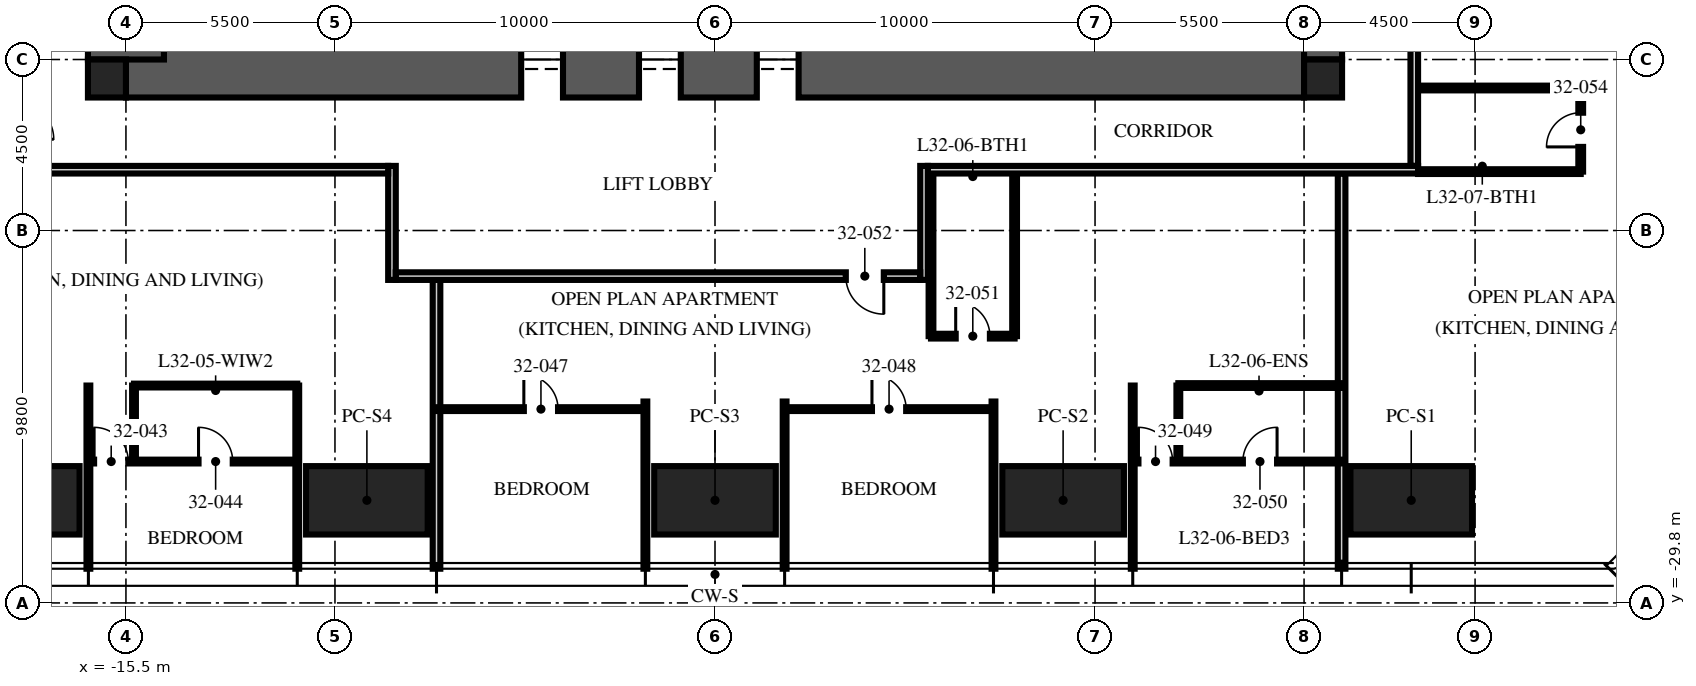
"""IFC4 building model, lengths in metres.
Left out: names, types, materials, properties, quantities, classifications, styles, units other than length and angle.
Written with IfcOpenShell. Run it as: python <this file> out.ifc"""

import sys

from ifc_helpers import new_model, si_unit, direction, frame, frame_2d, origin, origin_2d, place, context, subcontext, project, spatial, rectangle, extrude, element, fill, save


model = new_model("IFC4")
c1 = context("Model", 3, precision=1e-05, world=origin(), true_north=direction((0.0, 1.0)))
c2 = subcontext(c1, "Body", "Model", "MODEL_VIEW")
j1 = project(units=[si_unit("LENGTHUNIT", "METRE"), si_unit("PLANEANGLEUNIT", "RADIAN")], contexts=[c1])
p1 = place(None, origin())
s1 = spatial("IfcSite", under=j1, at=p1, CompositionType="ELEMENT")
p2 = place(p1, origin())
s2 = spatial("IfcBuilding", under=s1, at=p2, CompositionType="ELEMENT")
p3 = place(p2, frame((0.0, 0.0, 129.75)))
s3 = spatial("IfcBuildingStorey", under=s2, at=p3, CompositionType="ELEMENT", Elevation=129.75)
p4 = place(p3, frame((15.5, -15.5, -0.25), z_axis=(0.0, 0.0, 1.0), x_axis=(0.0, 1.0, 0.0)))
e1 = element("IfcWall", 1, at=p4, inside=s3, PredefinedType="SHEAR", context=c2, shape_type="SweptSolid", body=[
    extrude(rectangle(XDim=31.0, YDim=2.0, at=frame_2d((15.5, 0.0))), origin(), (0.0, 0.0, 1.0), 3.75),
])
p5 = place(p4, frame((6.5, 0.0, 0.25)))
e2 = element("IfcOpeningElement", 2, at=p5, cuts=e1, PredefinedType="OPENING", context=c2, shape_type="SweptSolid", body=[
    extrude(rectangle(XDim=1.2, YDim=2.1, at=frame_2d((0.6, 1.05))), frame((0.0, 1.01, 0.0), z_axis=(0.0, -1.0, 0.0), x_axis=(1.0, 0.0, 0.0)), (0.0, 0.0, 1.0), 2.02),
])
p6 = place(p4, frame((23.0, 0.0, 0.25)))
e3 = element("IfcOpeningElement", 3, at=p6, cuts=e1, PredefinedType="OPENING", context=c2, shape_type="SweptSolid", body=[
    extrude(rectangle(XDim=1.8, YDim=2.1, at=frame_2d((0.9, 1.05))), frame((0.0, 1.01, 0.0), z_axis=(0.0, -1.0, 0.0), x_axis=(1.0, 0.0, 0.0)), (0.0, 0.0, 1.0), 2.02),
])
p7 = place(p3, frame((-15.5, -15.5, -0.25), z_axis=(0.0, 0.0, 1.0), x_axis=(1.0, 0.0, 0.0)))
e4 = element("IfcWall", 4, at=p7, inside=s3, PredefinedType="SHEAR", context=c2, shape_type="SweptSolid", body=[
    extrude(rectangle(XDim=31.0, YDim=2.0, at=frame_2d((15.5, 0.0))), origin(), (0.0, 0.0, 1.0), 3.75),
])
p8 = place(p7, frame((10.4, 0.0, 0.25)))
e5 = element("IfcOpeningElement", 5, at=p8, cuts=e4, PredefinedType="OPENING", context=c2, shape_type="SweptSolid", body=[
    extrude(rectangle(XDim=1.1, YDim=2.1, at=frame_2d((0.55, 1.05))), frame((0.0, 1.01, 0.0), z_axis=(0.0, -1.0, 0.0), x_axis=(1.0, 0.0, 0.0)), (0.0, 0.0, 1.0), 2.02),
])
p9 = place(p7, frame((13.5, 0.0, 0.25)))
e6 = element("IfcOpeningElement", 6, at=p9, cuts=e4, PredefinedType="OPENING", context=c2, shape_type="SweptSolid", body=[
    extrude(rectangle(XDim=1.1, YDim=2.1, at=frame_2d((0.55, 1.05))), frame((0.0, 1.01, 0.0), z_axis=(0.0, -1.0, 0.0), x_axis=(1.0, 0.0, 0.0)), (0.0, 0.0, 1.0), 2.02),
])
p10 = place(p7, frame((16.6, 0.0, 0.25)))
e7 = element("IfcOpeningElement", 7, at=p10, cuts=e4, PredefinedType="OPENING", context=c2, shape_type="SweptSolid", body=[
    extrude(rectangle(XDim=1.1, YDim=2.1, at=frame_2d((0.55, 1.05))), frame((0.0, 1.01, 0.0), z_axis=(0.0, -1.0, 0.0), x_axis=(1.0, 0.0, 0.0)), (0.0, 0.0, 1.0), 2.02),
])
p11 = place(p3, frame((-15.5, -15.5, -0.25), z_axis=(0.0, 0.0, 1.0), x_axis=(0.0, 1.0, 0.0)))
e8 = element("IfcWall", 8, at=p11, inside=s3, PredefinedType="SHEAR", context=c2, shape_type="SweptSolid", body=[
    extrude(rectangle(XDim=31.0, YDim=2.0, at=frame_2d((15.5, 0.0))), origin(), (0.0, 0.0, 1.0), 3.75),
])
p12 = place(p11, frame((6.5, 0.0, 0.25)))
e9 = element("IfcOpeningElement", 9, at=p12, cuts=e8, PredefinedType="OPENING", context=c2, shape_type="SweptSolid", body=[
    extrude(rectangle(XDim=1.2, YDim=2.1, at=frame_2d((0.6, 1.05))), frame((0.0, 1.01, 0.0), z_axis=(0.0, -1.0, 0.0), x_axis=(1.0, 0.0, 0.0)), (0.0, 0.0, 1.0), 2.02),
])
p13 = place(p11, frame((23.0, 0.0, 0.25)))
e10 = element("IfcOpeningElement", 10, at=p13, cuts=e8, PredefinedType="OPENING", context=c2, shape_type="SweptSolid", body=[
    extrude(rectangle(XDim=1.8, YDim=2.1, at=frame_2d((0.9, 1.05))), frame((0.0, 1.01, 0.0), z_axis=(0.0, -1.0, 0.0), x_axis=(1.0, 0.0, 0.0)), (0.0, 0.0, 1.0), 2.02),
])
for number, where, z_axis, x_axis in (
    (11, (-16.0, -16.0, -0.25), (0.0, 0.0, 1.0), (1.0, 0.0, 0.0)),
    (12, (16.0, -16.0, -0.25), (0.0, 0.0, 1.0), (1.0, 0.0, 0.0)),
):
    element("IfcColumn", number, at=place(p3, frame(where, z_axis=z_axis, x_axis=x_axis)), inside=s3, PredefinedType="COLUMN", context=c2, shape_type="SweptSolid", body=[
        extrude(rectangle(XDim=1.0, YDim=1.0, at=origin_2d()), origin(), (0.0, 0.0, 1.0), 3.75),
    ])
for number, where, z_axis, x_axis in (
    (13, (18.32, -27.1, 0.0), (0.0, 0.0, 1.0), (1.0, 0.0, 0.0)),
    (14, (9.16, -27.1, 0.0), (0.0, 0.0, 1.0), (1.0, 0.0, 0.0)),
    (15, (0.0, -27.1, 0.0), (0.0, 0.0, 1.0), (1.0, 0.0, 0.0)),
    (16, (-9.16, -27.1, 0.0), (0.0, 0.0, 1.0), (1.0, 0.0, 0.0)),
    (17, (-18.32, -27.1, 0.0), (0.0, 0.0, 1.0), (1.0, 0.0, 0.0)),
):
    element("IfcColumn", number, at=place(p3, frame(where, z_axis=z_axis, x_axis=x_axis)), inside=s3, PredefinedType="COLUMN", context=c2, shape_type="SweptSolid", body=[
        extrude(rectangle(XDim=3.2, YDim=1.8, at=origin_2d()), origin(), (0.0, 0.0, 1.0), 3.75),
    ])
for number, where, z_axis, x_axis in (
    (18, (-16.488, -24.08, 0.0), (0.0, 0.0, 1.0), (0.0, -1.0, 0.0)),
    (19, (-10.992, -24.08, 0.0), (0.0, 0.0, 1.0), (0.0, -1.0, 0.0)),
):
    element("IfcWall", number, at=place(p3, frame(where, z_axis=z_axis, x_axis=x_axis)), inside=s3, PredefinedType="PARTITIONING", context=c2, shape_type="SweptSolid", body=[
        extrude(rectangle(XDim=4.82, YDim=0.1, at=frame_2d((2.41, 0.0))), origin(), (0.0, 0.0, 1.0), 2.81),
    ])
p14 = place(p3, frame((-7.328, -21.3, 0.0), z_axis=(0.0, 0.0, 1.0), x_axis=(0.0, -1.0, 0.0)))
e20 = element("IfcWall", 20, at=p14, inside=s3, PredefinedType="PARTITIONING", context=c2, shape_type="SweptSolid", body=[
    extrude(rectangle(XDim=7.6, YDim=0.2, at=frame_2d((3.8, 0.0))), origin(), (0.0, 0.0, 1.0), 2.81),
])
for number, where, z_axis, x_axis in (
    (21, (-1.832, -24.5, 0.0), (0.0, 0.0, 1.0), (0.0, -1.0, 0.0)),
    (22, (1.832, -24.5, 0.0), (0.0, 0.0, 1.0), (0.0, -1.0, 0.0)),
    (23, (7.328, -24.5, 0.0), (0.0, 0.0, 1.0), (0.0, -1.0, 0.0)),
):
    element("IfcWall", number, at=place(p3, frame(where, z_axis=z_axis, x_axis=x_axis)), inside=s3, PredefinedType="PARTITIONING", context=c2, shape_type="SweptSolid", body=[
        extrude(rectangle(XDim=4.4, YDim=0.1, at=frame_2d((2.2, 0.0))), origin(), (0.0, 0.0, 1.0), 2.81),
    ])
p15 = place(p3, frame((10.992, -24.08, 0.0), z_axis=(0.0, 0.0, 1.0), x_axis=(0.0, -1.0, 0.0)))
e24 = element("IfcWall", 24, at=p15, inside=s3, PredefinedType="PARTITIONING", context=c2, shape_type="SweptSolid", body=[
    extrude(rectangle(XDim=4.82, YDim=0.1, at=frame_2d((2.41, 0.0))), origin(), (0.0, 0.0, 1.0), 2.81),
])
p16 = place(p3, frame((16.488, -18.5, 0.0), z_axis=(0.0, 0.0, 1.0), x_axis=(0.0, -1.0, 0.0)))
e25 = element("IfcWall", 25, at=p16, inside=s3, PredefinedType="PARTITIONING", context=c2, shape_type="SweptSolid", body=[
    extrude(rectangle(XDim=10.4, YDim=0.2, at=frame_2d((5.2, 0.0))), origin(), (0.0, 0.0, 1.0), 2.81),
])
p17 = place(p3, frame((-16.488, -26.08, 0.0), z_axis=(0.0, 0.0, 1.0), x_axis=(1.0, 0.0, 0.0)))
e26 = element("IfcWall", 26, at=p17, inside=s3, PredefinedType="PARTITIONING", context=c2, shape_type="SweptSolid", body=[
    extrude(rectangle(XDim=5.496, YDim=0.1, at=frame_2d((2.748, 0.0))), origin(), (0.0, 0.0, 1.0), 2.81),
])
p18 = place(p17, frame((0.15, 0.0, 0.0)))
e27 = element("IfcOpeningElement", 27, at=p18, cuts=e26, PredefinedType="OPENING", context=c2, shape_type="SweptSolid", body=[
    extrude(rectangle(XDim=0.9, YDim=2.1, at=frame_2d((0.45, 1.05))), frame((0.0, 0.06, 0.0), z_axis=(0.0, -1.0, 0.0), x_axis=(1.0, 0.0, 0.0)), (0.0, 0.0, 1.0), 0.12),
])
p19 = place(p17, frame((2.898, 0.0, 0.0)))
e28 = element("IfcOpeningElement", 28, at=p19, cuts=e26, PredefinedType="OPENING", context=c2, shape_type="SweptSolid", body=[
    extrude(rectangle(XDim=0.9, YDim=2.1, at=frame_2d((0.45, 1.05))), frame((0.0, 0.06, 0.0), z_axis=(0.0, -1.0, 0.0), x_axis=(1.0, 0.0, 0.0)), (0.0, 0.0, 1.0), 0.12),
])
p20 = place(p3, frame((-15.288, -24.08, 0.0), z_axis=(0.0, 0.0, 1.0), x_axis=(0.0, -1.0, 0.0)))
e29 = element("IfcWall", 29, at=p20, inside=s3, PredefinedType="PARTITIONING", context=c2, shape_type="SweptSolid", body=[
    extrude(rectangle(XDim=2.0, YDim=0.1, at=frame_2d((1.0, 0.0))), origin(), (0.0, 0.0, 1.0), 3.5),
])
p21 = place(p3, frame((-15.288, -24.08, 0.0), z_axis=(0.0, 0.0, 1.0), x_axis=(1.0, 0.0, 0.0)))
e30 = element("IfcWall", 30, at=p21, inside=s3, PredefinedType="PARTITIONING", context=c2, shape_type="SweptSolid", body=[
    extrude(rectangle(XDim=4.296, YDim=0.1, at=frame_2d((2.148, 0.0))), origin(), (0.0, 0.0, 1.0), 2.81),
])
p22 = place(p3, frame((-7.328, -24.7, 0.0), z_axis=(0.0, 0.0, 1.0), x_axis=(1.0, 0.0, 0.0)))
e31 = element("IfcWall", 31, at=p22, inside=s3, PredefinedType="PARTITIONING", context=c2, shape_type="SweptSolid", body=[
    extrude(rectangle(XDim=5.496, YDim=0.1, at=frame_2d((2.748, 0.0))), origin(), (0.0, 0.0, 1.0), 2.81),
])
p23 = place(p22, frame((2.298, 0.0, 0.0)))
e32 = element("IfcOpeningElement", 32, at=p23, cuts=e31, PredefinedType="OPENING", context=c2, shape_type="SweptSolid", body=[
    extrude(rectangle(XDim=0.9, YDim=2.1, at=frame_2d((0.45, 1.05))), frame((0.0, 0.06, 0.0), z_axis=(0.0, -1.0, 0.0), x_axis=(1.0, 0.0, 0.0)), (0.0, 0.0, 1.0), 0.12),
])
p24 = place(p3, frame((1.832, -24.7, 0.0), z_axis=(0.0, 0.0, 1.0), x_axis=(1.0, 0.0, 0.0)))
e33 = element("IfcWall", 33, at=p24, inside=s3, PredefinedType="PARTITIONING", context=c2, shape_type="SweptSolid", body=[
    extrude(rectangle(XDim=5.496, YDim=0.1, at=frame_2d((2.748, 0.0))), origin(), (0.0, 0.0, 1.0), 2.81),
])
p25 = place(p24, frame((2.298, 0.0, 0.0)))
e34 = element("IfcOpeningElement", 34, at=p25, cuts=e33, PredefinedType="OPENING", context=c2, shape_type="SweptSolid", body=[
    extrude(rectangle(XDim=0.9, YDim=2.1, at=frame_2d((0.45, 1.05))), frame((0.0, 0.06, 0.0), z_axis=(0.0, -1.0, 0.0), x_axis=(1.0, 0.0, 0.0)), (0.0, 0.0, 1.0), 0.12),
])
p26 = place(p3, frame((10.992, -26.08, 0.0), z_axis=(0.0, 0.0, 1.0), x_axis=(1.0, 0.0, 0.0)))
e35 = element("IfcWall", 35, at=p26, inside=s3, PredefinedType="PARTITIONING", context=c2, shape_type="SweptSolid", body=[
    extrude(rectangle(XDim=5.496, YDim=0.1, at=frame_2d((2.748, 0.0))), origin(), (0.0, 0.0, 1.0), 2.81),
])
p27 = place(p26, frame((0.15, 0.0, 0.0)))
e36 = element("IfcOpeningElement", 36, at=p27, cuts=e35, PredefinedType="OPENING", context=c2, shape_type="SweptSolid", body=[
    extrude(rectangle(XDim=0.9, YDim=2.1, at=frame_2d((0.45, 1.05))), frame((0.0, 0.06, 0.0), z_axis=(0.0, -1.0, 0.0), x_axis=(1.0, 0.0, 0.0)), (0.0, 0.0, 1.0), 0.12),
])
p28 = place(p26, frame((2.898, 0.0, 0.0)))
e37 = element("IfcOpeningElement", 37, at=p28, cuts=e35, PredefinedType="OPENING", context=c2, shape_type="SweptSolid", body=[
    extrude(rectangle(XDim=0.9, YDim=2.1, at=frame_2d((0.45, 1.05))), frame((0.0, 0.06, 0.0), z_axis=(0.0, -1.0, 0.0), x_axis=(1.0, 0.0, 0.0)), (0.0, 0.0, 1.0), 0.12),
])
p29 = place(p3, frame((12.192, -24.08, 0.0), z_axis=(0.0, 0.0, 1.0), x_axis=(0.0, -1.0, 0.0)))
e38 = element("IfcWall", 38, at=p29, inside=s3, PredefinedType="PARTITIONING", context=c2, shape_type="SweptSolid", body=[
    extrude(rectangle(XDim=2.0, YDim=0.1, at=frame_2d((1.0, 0.0))), origin(), (0.0, 0.0, 1.0), 3.5),
])
p30 = place(p3, frame((12.192, -24.08, 0.0), z_axis=(0.0, 0.0, 1.0), x_axis=(1.0, 0.0, 0.0)))
e39 = element("IfcWall", 39, at=p30, inside=s3, PredefinedType="PARTITIONING", context=c2, shape_type="SweptSolid", body=[
    extrude(rectangle(XDim=4.296, YDim=0.125, at=frame_2d((2.148, 0.0))), origin(), (0.0, 0.0, 1.0), 2.81),
])
p31 = place(p3, frame((5.684, -22.78, 0.0), z_axis=(0.0, 0.0, 1.0), x_axis=(1.0, 0.0, 0.0)))
e40 = element("IfcWall", 40, at=p31, inside=s3, PredefinedType="PARTITIONING", context=c2, shape_type="SweptSolid", body=[
    extrude(rectangle(XDim=2.2, YDim=0.125, at=frame_2d((1.1, 0.0))), origin(), (0.0, 0.0, 1.0), 3.5),
])
p32 = place(p31, frame((0.65, 0.0, 0.0)))
e41 = element("IfcOpeningElement", 41, at=p32, cuts=e40, PredefinedType="OPENING", context=c2, shape_type="SweptSolid", body=[
    extrude(rectangle(XDim=0.9, YDim=2.1, at=frame_2d((0.45, 1.05))), frame((0.0, 0.073, 0.0), z_axis=(0.0, -1.0, 0.0), x_axis=(1.0, 0.0, 0.0)), (0.0, 0.0, 1.0), 0.145),
])
for number, where, z_axis, x_axis in (
    (42, (5.684, -18.5, 0.0), (0.0, 0.0, 1.0), (0.0, -1.0, 0.0)),
    (43, (7.884, -18.5, 0.0), (0.0, 0.0, 1.0), (0.0, -1.0, 0.0)),
):
    element("IfcWall", number, at=place(p3, frame(where, z_axis=z_axis, x_axis=x_axis)), inside=s3, PredefinedType="PARTITIONING", context=c2, shape_type="SweptSolid", body=[
        extrude(rectangle(XDim=4.28, YDim=0.125, at=frame_2d((2.14, 0.0))), origin(), (0.0, 0.0, 1.0), 3.5),
    ])
p33 = place(p3, frame((22.78, -18.45, 0.0), z_axis=(0.0, 0.0, 1.0), x_axis=(0.0, 1.0, 0.0)))
e44 = element("IfcWall", 44, at=p33, inside=s3, PredefinedType="PARTITIONING", context=c2, shape_type="SweptSolid", body=[
    extrude(rectangle(XDim=2.2, YDim=0.125, at=frame_2d((1.1, 0.0))), origin(), (0.0, 0.0, 1.0), 2.7),
])
p34 = place(p33, frame((0.65, 0.0, 0.0)))
e45 = element("IfcOpeningElement", 45, at=p34, cuts=e44, PredefinedType="OPENING", context=c2, shape_type="SweptSolid", body=[
    extrude(rectangle(XDim=0.9, YDim=2.1, at=frame_2d((0.45, 1.05))), frame((0.0, 0.073, 0.0), z_axis=(0.0, -1.0, 0.0), x_axis=(1.0, 0.0, 0.0)), (0.0, 0.0, 1.0), 0.145),
])
p35 = place(p3, frame((18.5, -18.45, 0.0), z_axis=(0.0, 0.0, 1.0), x_axis=(1.0, 0.0, 0.0)))
e46 = element("IfcWall", 46, at=p35, inside=s3, PredefinedType="PARTITIONING", context=c2, shape_type="SweptSolid", body=[
    extrude(rectangle(XDim=4.28, YDim=0.125, at=frame_2d((2.14, 0.0))), origin(), (0.0, 0.0, 1.0), 2.3),
])
p36 = place(p3, frame((18.5, -16.25, 0.0), z_axis=(0.0, 0.0, 1.0), x_axis=(1.0, 0.0, 0.0)))
e47 = element("IfcWall", 47, at=p36, inside=s3, PredefinedType="PARTITIONING", context=c2, shape_type="SweptSolid", body=[
    extrude(rectangle(XDim=4.28, YDim=0.125, at=frame_2d((2.14, 0.0))), origin(), (0.0, 0.0, 1.0), 3.5),
])
p37 = place(p3, frame((18.4, -18.3, 0.0), z_axis=(0.0, 0.0, 1.0), x_axis=(0.0, 1.0, 0.0)))
e48 = element("IfcWall", 48, at=p37, inside=s3, PredefinedType="PARTITIONING", context=c2, shape_type="SweptSolid", body=[
    extrude(rectangle(XDim=8.972, YDim=0.2, at=frame_2d((4.486, 0.0))), origin(), (0.0, 0.0, 1.0), 2.3),
])
p38 = place(p3, frame((18.5, -18.4, 0.0), z_axis=(0.0, 0.0, 1.0), x_axis=(-1.0, 0.0, 0.0)))
e49 = element("IfcWall", 49, at=p38, inside=s3, PredefinedType="PARTITIONING", context=c2, shape_type="SweptSolid", body=[
    extrude(rectangle(XDim=12.9, YDim=0.2, at=frame_2d((6.45, 0.0))), origin(), (0.0, 0.0, 1.0), 2.3),
])
for number, where, z_axis, x_axis in (
    (50, (5.5, -18.3, 0.0), (0.0, 0.0, 1.0), (0.0, -1.0, 0.0)),
    (51, (-8.5, -18.3, 0.0), (0.0, 0.0, 1.0), (0.0, -1.0, 0.0)),
):
    element("IfcWall", number, at=place(p3, frame(where, z_axis=z_axis, x_axis=x_axis)), inside=s3, PredefinedType="PARTITIONING", context=c2, shape_type="SweptSolid", body=[
        extrude(rectangle(XDim=3.0, YDim=0.2, at=frame_2d((1.5, 0.0))), origin(), (0.0, 0.0, 1.0), 3.5),
    ])
p39 = place(p3, frame((5.4, -21.2, 0.0), z_axis=(0.0, 0.0, 1.0), x_axis=(-1.0, 0.0, 0.0)))
e52 = element("IfcWall", 52, at=p39, inside=s3, PredefinedType="PARTITIONING", context=c2, shape_type="SweptSolid", body=[
    extrude(rectangle(XDim=13.8, YDim=0.2, at=frame_2d((6.9, 0.0))), origin(), (0.0, 0.0, 1.0), 2.7),
])
p40 = place(p39, frame((0.958, 0.0, 0.0)))
e53 = element("IfcOpeningElement", 53, at=p40, cuts=e52, PredefinedType="OPENING", context=c2, shape_type="SweptSolid", body=[
    extrude(rectangle(XDim=1.0, YDim=2.2, at=frame_2d((0.5, 1.1))), frame((0.0, 0.11, 0.0), z_axis=(0.0, -1.0, 0.0), x_axis=(1.0, 0.0, 0.0)), (0.0, 0.0, 1.0), 0.22),
])
p41 = place(p3, frame((-8.6, -18.4, 0.0), z_axis=(0.0, 0.0, 1.0), x_axis=(-1.0, 0.0, 0.0)))
e54 = element("IfcWall", 54, at=p41, inside=s3, PredefinedType="PARTITIONING", context=c2, shape_type="SweptSolid", body=[
    extrude(rectangle(XDim=9.9, YDim=0.2, at=frame_2d((4.95, 0.0))), origin(), (0.0, 0.0, 1.0), 2.3),
])
p42 = place(p8, origin())
e55 = element("IfcDoor", 55, at=p42, inside=s3, OperationType="DOUBLE_DOOR_SLIDING", PredefinedType="DOOR", context=c2, shape_type="SweptSolid", body=[
    extrude(rectangle(XDim=1.1, YDim=2.1, at=frame_2d((0.55, 1.05))), frame((0.0, 0.025, 0.0), z_axis=(0.0, -1.0, 0.0), x_axis=(1.0, 0.0, 0.0)), (0.0, 0.0, 1.0), 0.05),
])
fill(e5, e55)
p43 = place(p9, origin())
e56 = element("IfcDoor", 56, at=p43, inside=s3, OperationType="DOUBLE_DOOR_SLIDING", PredefinedType="DOOR", context=c2, shape_type="SweptSolid", body=[
    extrude(rectangle(XDim=1.1, YDim=2.1, at=frame_2d((0.55, 1.05))), frame((0.0, 0.025, 0.0), z_axis=(0.0, -1.0, 0.0), x_axis=(1.0, 0.0, 0.0)), (0.0, 0.0, 1.0), 0.05),
])
fill(e6, e56)
p44 = place(p10, origin())
e57 = element("IfcDoor", 57, at=p44, inside=s3, OperationType="DOUBLE_DOOR_SLIDING", PredefinedType="DOOR", context=c2, shape_type="SweptSolid", body=[
    extrude(rectangle(XDim=1.1, YDim=2.1, at=frame_2d((0.55, 1.05))), frame((0.0, 0.025, 0.0), z_axis=(0.0, -1.0, 0.0), x_axis=(1.0, 0.0, 0.0)), (0.0, 0.0, 1.0), 0.05),
])
fill(e7, e57)
p45 = place(p18, origin())
e58 = element("IfcDoor", 58, at=p45, inside=s3, OperationType="SINGLE_SWING_LEFT", PredefinedType="DOOR", context=c2, shape_type="SweptSolid", body=[
    extrude(rectangle(XDim=0.9, YDim=2.1, at=frame_2d((0.45, 1.05))), frame((0.0, 0.025, 0.0), z_axis=(0.0, -1.0, 0.0), x_axis=(1.0, 0.0, 0.0)), (0.0, 0.0, 1.0), 0.05),
])
fill(e27, e58)
p46 = place(p19, origin())
e59 = element("IfcDoor", 59, at=p46, inside=s3, OperationType="SINGLE_SWING_LEFT", PredefinedType="DOOR", context=c2, shape_type="SweptSolid", body=[
    extrude(rectangle(XDim=0.9, YDim=2.1, at=frame_2d((0.45, 1.05))), frame((0.0, 0.025, 0.0), z_axis=(0.0, -1.0, 0.0), x_axis=(1.0, 0.0, 0.0)), (0.0, 0.0, 1.0), 0.05),
])
fill(e28, e59)
p47 = place(p23, origin())
e60 = element("IfcDoor", 60, at=p47, inside=s3, OperationType="SINGLE_SWING_LEFT", PredefinedType="DOOR", context=c2, shape_type="SweptSolid", body=[
    extrude(rectangle(XDim=0.9, YDim=2.1, at=frame_2d((0.45, 1.05))), frame((0.0, 0.025, 0.0), z_axis=(0.0, -1.0, 0.0), x_axis=(1.0, 0.0, 0.0)), (0.0, 0.0, 1.0), 0.05),
])
fill(e32, e60)
p48 = place(p25, origin())
e61 = element("IfcDoor", 61, at=p48, inside=s3, OperationType="SINGLE_SWING_LEFT", PredefinedType="DOOR", context=c2, shape_type="SweptSolid", body=[
    extrude(rectangle(XDim=0.9, YDim=2.1, at=frame_2d((0.45, 1.05))), frame((0.0, 0.025, 0.0), z_axis=(0.0, -1.0, 0.0), x_axis=(1.0, 0.0, 0.0)), (0.0, 0.0, 1.0), 0.05),
])
fill(e34, e61)
p49 = place(p27, origin())
e62 = element("IfcDoor", 62, at=p49, inside=s3, OperationType="SINGLE_SWING_LEFT", PredefinedType="DOOR", context=c2, shape_type="SweptSolid", body=[
    extrude(rectangle(XDim=0.9, YDim=2.1, at=frame_2d((0.45, 1.05))), frame((0.0, 0.025, 0.0), z_axis=(0.0, -1.0, 0.0), x_axis=(1.0, 0.0, 0.0)), (0.0, 0.0, 1.0), 0.05),
])
fill(e36, e62)
p50 = place(p28, origin())
e63 = element("IfcDoor", 63, at=p50, inside=s3, OperationType="SINGLE_SWING_RIGHT", PredefinedType="DOOR", context=c2, shape_type="SweptSolid", body=[
    extrude(rectangle(XDim=0.9, YDim=2.1, at=frame_2d((0.45, 1.05))), frame((0.0, 0.025, 0.0), z_axis=(0.0, -1.0, 0.0), x_axis=(1.0, 0.0, 0.0)), (0.0, 0.0, 1.0), 0.05),
])
fill(e37, e63)
p51 = place(p32, origin())
e64 = element("IfcDoor", 64, at=p51, inside=s3, OperationType="SINGLE_SWING_LEFT", PredefinedType="DOOR", context=c2, shape_type="SweptSolid", body=[
    extrude(rectangle(XDim=0.9, YDim=2.1, at=frame_2d((0.45, 1.05))), frame((0.0, 0.025, 0.0), z_axis=(0.0, -1.0, 0.0), x_axis=(1.0, 0.0, 0.0)), (0.0, 0.0, 1.0), 0.05),
])
fill(e41, e64)
p52 = place(p40, origin())
e65 = element("IfcDoor", 65, at=p52, inside=s3, OperationType="SINGLE_SWING_LEFT", PredefinedType="DOOR", context=c2, shape_type="SweptSolid", body=[
    extrude(rectangle(XDim=1.0, YDim=2.2, at=frame_2d((0.5, 1.1))), frame((0.0, 0.025, 0.0), z_axis=(0.0, -1.0, 0.0), x_axis=(1.0, 0.0, 0.0)), (0.0, 0.0, 1.0), 0.05),
])
fill(e53, e65)
p53 = place(p34, origin())
e66 = element("IfcDoor", 66, at=p53, inside=s3, OperationType="SINGLE_SWING_LEFT", PredefinedType="DOOR", context=c2, shape_type="SweptSolid", body=[
    extrude(rectangle(XDim=0.9, YDim=2.1, at=frame_2d((0.45, 1.05))), frame((0.0, 0.025, 0.0), z_axis=(0.0, -1.0, 0.0), x_axis=(1.0, 0.0, 0.0)), (0.0, 0.0, 1.0), 0.05),
])
fill(e45, e66)
save(model, sys.argv[1])
